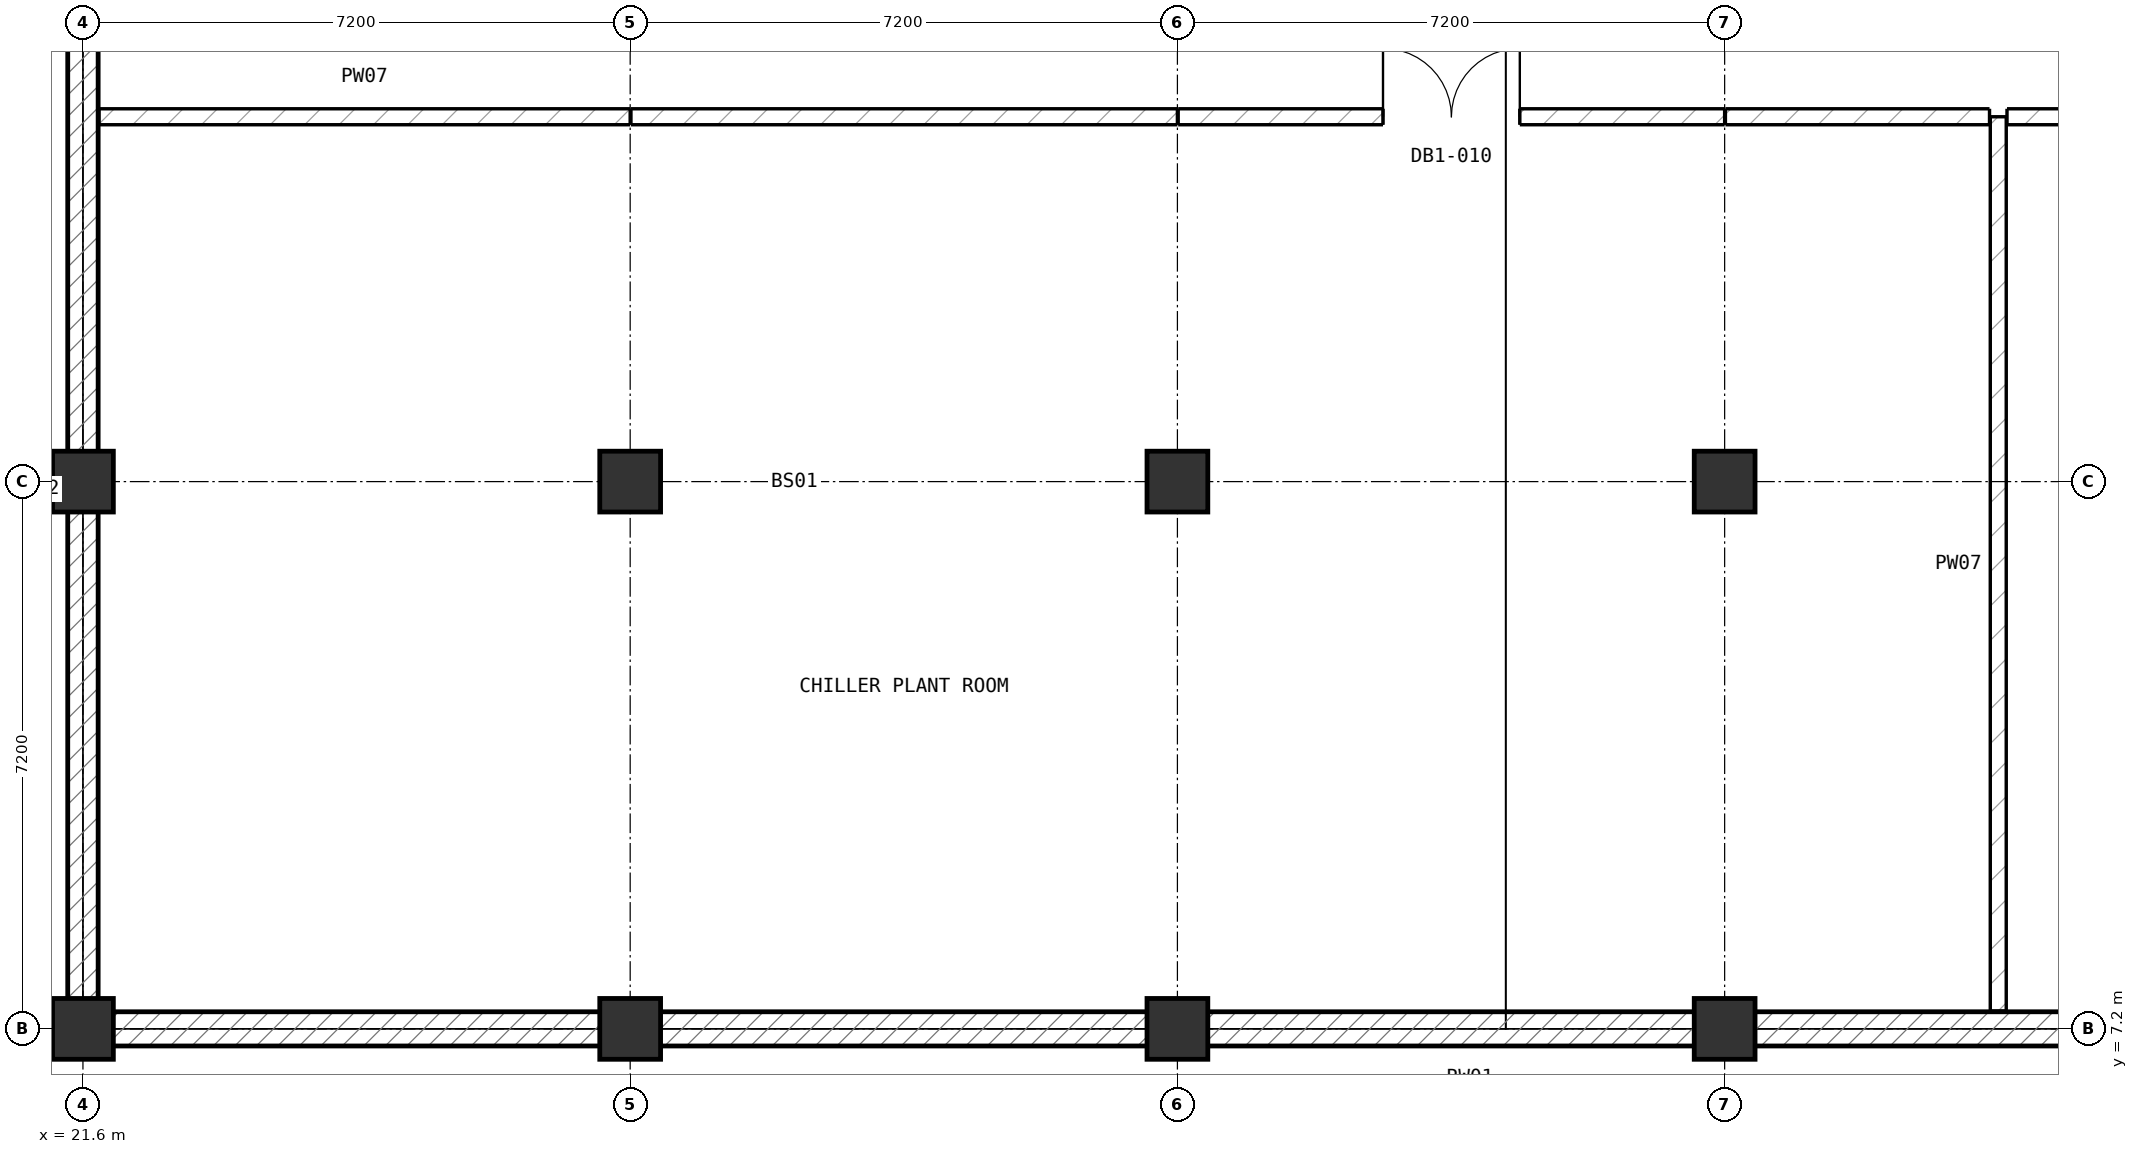
"""IFC4 building model, lengths in metres.
Left out: names, types, materials, properties, quantities, classifications, styles, units other than length and angle.
Written with IfcOpenShell. Run it as: python <this file> out.ifc"""

import sys

from ifc_helpers import new_model, si_unit, direction, frame, frame_2d, origin, origin_2d, place, context, subcontext, project, spatial, rectangle, extrude, element, fill, save


model = new_model("IFC4")
c1 = context("Model", 3, precision=1e-05, world=origin(), true_north=direction((0.0, 1.0)))
c2 = subcontext(c1, "Body", "Model", "MODEL_VIEW")
j1 = project(units=[si_unit("LENGTHUNIT", "METRE"), si_unit("PLANEANGLEUNIT", "RADIAN")], contexts=[c1])
p1 = place(None, origin())
s1 = spatial("IfcSite", under=j1, at=p1, CompositionType="ELEMENT")
p2 = place(p1, origin())
s2 = spatial("IfcBuilding", under=s1, at=p2, CompositionType="ELEMENT")
p3 = place(p2, frame((0.0, 0.0, -4.5)))
s3 = spatial("IfcBuildingStorey", under=s2, at=p3, CompositionType="ELEMENT", Elevation=-4.5)
for number, where, z_axis, x_axis in (
    (1, (21.6, 7.2, 0.0), (0.0, 0.0, 1.0), (1.0, 0.0, 0.0)),
    (2, (21.6, 14.4, 0.0), (0.0, 0.0, 1.0), (1.0, 0.0, 0.0)),
    (3, (28.8, 7.2, 0.0), (0.0, 0.0, 1.0), (1.0, 0.0, 0.0)),
    (4, (28.8, 14.4, 0.0), (0.0, 0.0, 1.0), (1.0, 0.0, 0.0)),
    (5, (36.0, 7.2, 0.0), (0.0, 0.0, 1.0), (1.0, 0.0, 0.0)),
    (6, (36.0, 14.4, 0.0), (0.0, 0.0, 1.0), (1.0, 0.0, 0.0)),
    (7, (43.2, 7.2, 0.0), (0.0, 0.0, 1.0), (1.0, 0.0, 0.0)),
    (8, (43.2, 14.4, 0.0), (0.0, 0.0, 1.0), (1.0, 0.0, 0.0)),
):
    element("IfcColumn", number, at=place(p3, frame(where, z_axis=z_axis, x_axis=x_axis)), inside=s3, PredefinedType="COLUMN", context=c2, shape_type="SweptSolid", body=[
        extrude(rectangle(XDim=0.8, YDim=0.8, at=origin_2d()), origin(), (0.0, 0.0, 1.0), 4.5),
    ])
p4 = place(p3, frame((68.4, 7.2, 0.0), z_axis=(0.0, 0.0, 1.0), x_axis=(-1.0, 0.0, 0.0)))
e9 = element("IfcWall", 9, at=p4, inside=s3, PredefinedType="USERDEFINED", context=c2, shape_type="SweptSolid", body=[
    extrude(rectangle(XDim=47.0, YDim=0.45, at=frame_2d((23.5, 0.0))), origin(), (0.0, 0.0, 1.0), 4.15),
])
p5 = place(p3, frame((21.6, 7.0, 0.0), z_axis=(0.0, 0.0, 1.0), x_axis=(0.0, 1.0, 0.0)))
e10 = element("IfcWall", 10, at=p5, inside=s3, PredefinedType="USERDEFINED", context=c2, shape_type="SweptSolid", body=[
    extrude(rectangle(XDim=14.6, YDim=0.4, at=frame_2d((7.3, 0.0))), origin(), (0.0, 0.0, 1.0), 4.15),
])
p6 = place(p3, frame((46.8, 7.435, 0.0), z_axis=(0.0, 0.0, 1.0), x_axis=(0.0, 1.0, 0.0)))
e11 = element("IfcWall", 11, at=p6, inside=s3, PredefinedType="PARTITIONING", context=c2, shape_type="SweptSolid", body=[
    extrude(rectangle(XDim=11.765, YDim=0.21, at=frame_2d((5.882, 0.0))), origin(), (0.0, 0.0, 1.0), 4.06),
])
p7 = place(p3, frame((21.81, 19.2, 0.0), z_axis=(0.0, 0.0, 1.0), x_axis=(1.0, 0.0, 0.0)))
e12 = element("IfcWall", 12, at=p7, inside=s3, PredefinedType="PARTITIONING", context=c2, shape_type="SweptSolid", body=[
    extrude(rectangle(XDim=6.99, YDim=0.21, at=frame_2d((3.495, 0.0))), origin(), (0.0, 0.0, 1.0), 4.06),
])
p8 = place(p3, frame((28.81, 19.2, 0.0), z_axis=(0.0, 0.0, 1.0), x_axis=(1.0, 0.0, 0.0)))
e13 = element("IfcWall", 13, at=p8, inside=s3, PredefinedType="PARTITIONING", context=c2, shape_type="SweptSolid", body=[
    extrude(rectangle(XDim=7.19, YDim=0.21, at=frame_2d((3.595, 0.0))), origin(), (0.0, 0.0, 1.0), 4.06),
])
p9 = place(p3, frame((36.01, 19.2, 0.0), z_axis=(0.0, 0.0, 1.0), x_axis=(1.0, 0.0, 0.0)))
e14 = element("IfcWall", 14, at=p9, inside=s3, PredefinedType="PARTITIONING", context=c2, shape_type="SweptSolid", body=[
    extrude(rectangle(XDim=7.19, YDim=0.21, at=frame_2d((3.595, 0.0))), origin(), (0.0, 0.0, 1.0), 4.06),
])
p10 = place(p9, frame((2.695, 0.0, 0.0)))
e15 = element("IfcOpeningElement", 15, at=p10, cuts=e14, PredefinedType="OPENING", context=c2, shape_type="SweptSolid", body=[
    extrude(rectangle(XDim=1.8, YDim=2.4, at=frame_2d((0.9, 1.2))), frame((0.0, 0.115, 0.0), z_axis=(0.0, -1.0, 0.0), x_axis=(1.0, 0.0, 0.0)), (0.0, 0.0, 1.0), 0.23),
])
p11 = place(p3, frame((43.21, 19.2, 0.0), z_axis=(0.0, 0.0, 1.0), x_axis=(1.0, 0.0, 0.0)))
e16 = element("IfcWall", 16, at=p11, inside=s3, PredefinedType="PARTITIONING", context=c2, shape_type="SweptSolid", body=[
    extrude(rectangle(XDim=3.475, YDim=0.21, at=frame_2d((1.738, 0.0))), origin(), (0.0, 0.0, 1.0), 4.06),
])
p12 = place(p3, frame((46.915, 19.2, 0.0), z_axis=(0.0, 0.0, 1.0), x_axis=(1.0, 0.0, 0.0)))
e17 = element("IfcWall", 17, at=p12, inside=s3, PredefinedType="PARTITIONING", context=c2, shape_type="SweptSolid", body=[
    extrude(rectangle(XDim=3.485, YDim=0.21, at=frame_2d((1.742, 0.0))), origin(), (0.0, 0.0, 1.0), 4.06),
])
p13 = place(p10, origin())
e18 = element("IfcDoor", 18, at=p13, inside=s3, OperationType="DOUBLE_DOOR_SINGLE_SWING", PredefinedType="DOOR", context=c2, shape_type="SweptSolid", body=[
    extrude(rectangle(XDim=1.8, YDim=2.4, at=frame_2d((0.9, 1.2))), frame((0.0, 0.025, 0.0), z_axis=(0.0, -1.0, 0.0), x_axis=(1.0, 0.0, 0.0)), (0.0, 0.0, 1.0), 0.05),
])
fill(e15, e18)
save(model, sys.argv[1])
